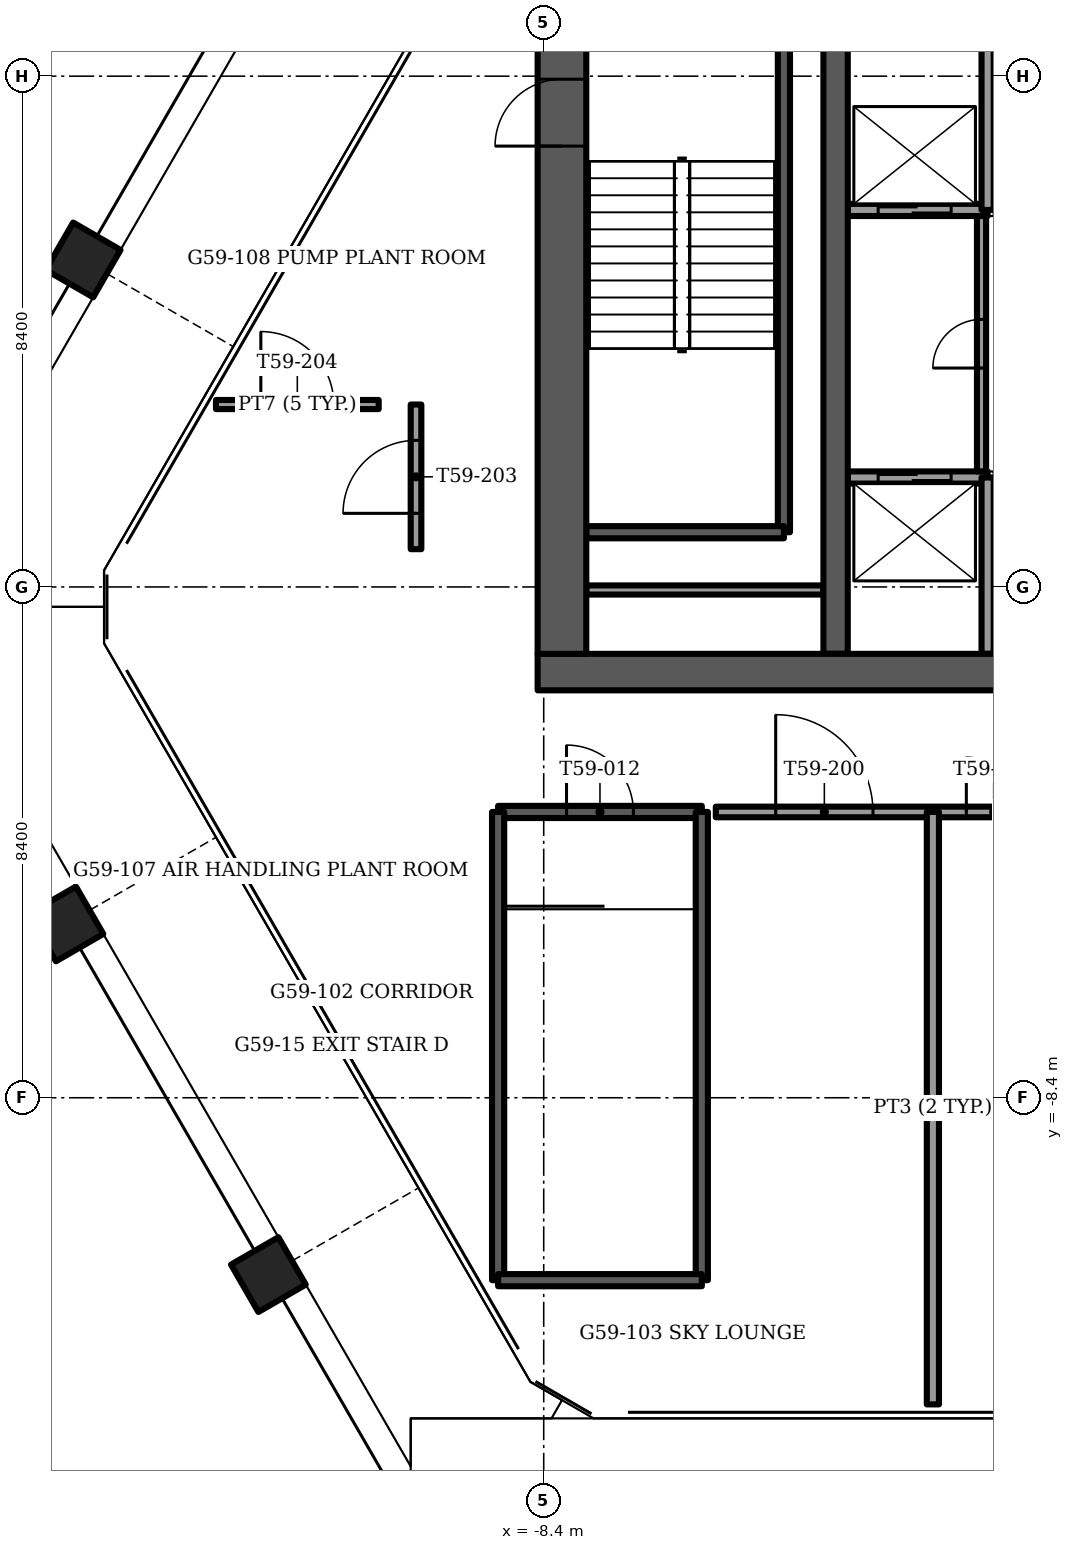
"""IFC4 building model, lengths in metres.
Left out: names, types, materials, properties, quantities, classifications, styles, units other than length and angle.
Written with IfcOpenShell. Run it as: python <this file> out.ifc"""

import sys

from ifc_helpers import new_model, si_unit, direction, frame, frame_2d, origin, origin_2d, place, context, subcontext, project, spatial, rectangle, extrude, element, fill, save


model = new_model("IFC4")
c1 = context("Model", 3, precision=1e-05, world=origin(), true_north=direction((0.0, 1.0)))
c2 = subcontext(c1, "Body", "Model", "MODEL_VIEW")
j1 = project(units=[si_unit("LENGTHUNIT", "METRE"), si_unit("PLANEANGLEUNIT", "RADIAN")], contexts=[c1])
p1 = place(None, origin())
s1 = spatial("IfcSite", under=j1, at=p1, CompositionType="ELEMENT")
p2 = place(p1, origin())
s2 = spatial("IfcBuilding", under=s1, at=p2, CompositionType="ELEMENT")
p3 = place(p2, frame((0.0, 0.0, 237.0)))
s3 = spatial("IfcBuildingStorey", under=s2, at=p3, CompositionType="ELEMENT", Elevation=237.0)
for number, where, z_axis, x_axis in (
    (1, (-15.974, 5.378, -1.2), (0.0, 0.0, 1.0), (0.5, 0.866, 0.0)),
    (2, (-16.257, -5.542, -1.2), (0.0, 0.0, 1.0), (-0.5, 0.866, 0.0)),
    (3, (-12.928, -11.308, -1.2), (0.0, 0.0, 1.0), (-0.5, 0.866, 0.0)),
):
    element("IfcColumn", number, at=place(p3, frame(where, z_axis=z_axis, x_axis=x_axis)), inside=s3, PredefinedType="COLUMN", context=c2, shape_type="SweptSolid", body=[
        extrude(rectangle(XDim=0.9, YDim=0.9, at=origin_2d()), origin(), (0.0, 0.0, 1.0), 8.0),
    ])
p4 = place(p3, frame((-8.5, -1.4, -0.3), z_axis=(0.0, 0.0, 1.0), x_axis=(1.0, 0.0, 0.0)))
e4 = element("IfcWall", 4, at=p4, inside=s3, PredefinedType="SHEAR", context=c2, shape_type="SweptSolid", body=[
    extrude(rectangle(XDim=17.0, YDim=0.6, at=frame_2d((8.5, 0.0))), origin(), (0.0, 0.0, 1.0), 8.0),
])
p5 = place(p4, frame((7.7, 0.0, 0.0)))
e5 = element("IfcOpeningElement", 5, at=p5, cuts=e4, PredefinedType="OPENING", context=c2, shape_type="SweptSolid", body=[
    extrude(rectangle(XDim=1.6, YDim=2.1, at=frame_2d((0.8, 1.05))), frame((0.0, 0.3, 0.0), z_axis=(0.0, -1.0, 0.0), x_axis=(1.0, 0.0, 0.0)), (0.0, 0.0, 1.0), 0.6),
])
p6 = place(p3, frame((-8.1, -1.1, -0.3), z_axis=(0.0, 0.0, 1.0), x_axis=(0.0, 1.0, 0.0)))
e6 = element("IfcWall", 6, at=p6, inside=s3, PredefinedType="SHEAR", context=c2, shape_type="SweptSolid", body=[
    extrude(rectangle(XDim=10.2, YDim=0.8, at=frame_2d((5.1, 0.0))), origin(), (0.0, 0.0, 1.0), 8.0),
])
p7 = place(p6, frame((8.35, 0.0, 0.0)))
e7 = element("IfcOpeningElement", 7, at=p7, cuts=e6, PredefinedType="OPENING", context=c2, shape_type="SweptSolid", body=[
    extrude(rectangle(XDim=1.1, YDim=2.1, at=frame_2d((0.55, 1.05))), frame((0.0, 0.4, 0.0), z_axis=(0.0, -1.0, 0.0), x_axis=(1.0, 0.0, 0.0)), (0.0, 0.0, 1.0), 0.8),
])
p8 = place(p3, frame((-3.6, -1.1, -0.3), z_axis=(0.0, 0.0, 1.0), x_axis=(0.0, 1.0, 0.0)))
e8 = element("IfcWall", 8, at=p8, inside=s3, PredefinedType="SHEAR", context=c2, shape_type="SweptSolid", body=[
    extrude(rectangle(XDim=10.2, YDim=0.4, at=frame_2d((5.1, 0.0))), origin(), (0.0, 0.0, 1.0), 8.0),
])
p9 = place(p3, frame((-3.4, 1.8, 0.0), z_axis=(0.0, 0.0, 1.0), x_axis=(1.0, 0.0, 0.0)))
e9 = element("IfcWall", 9, at=p9, inside=s3, PredefinedType="PARTITIONING", context=c2, shape_type="SweptSolid", body=[
    extrude(rectangle(XDim=2.3, YDim=0.2, at=frame_2d((1.15, 0.0))), origin(), (0.0, 0.0, 1.0), 7.7),
])
p10 = place(p9, frame((0.5, 0.0, 0.0)))
e10 = element("IfcOpeningElement", 10, at=p10, cuts=e9, PredefinedType="OPENING", context=c2, shape_type="SweptSolid", body=[
    extrude(rectangle(XDim=1.2, YDim=2.1, at=frame_2d((0.6, 1.05))), frame((0.0, 0.1, 0.0), z_axis=(0.0, -1.0, 0.0), x_axis=(1.0, 0.0, 0.0)), (0.0, 0.0, 1.0), 0.2),
])
p11 = place(p3, frame((-3.4, 6.2, 0.0), z_axis=(0.0, 0.0, 1.0), x_axis=(1.0, 0.0, 0.0)))
e11 = element("IfcWall", 11, at=p11, inside=s3, PredefinedType="PARTITIONING", context=c2, shape_type="SweptSolid", body=[
    extrude(rectangle(XDim=2.3, YDim=0.2, at=frame_2d((1.15, 0.0))), origin(), (0.0, 0.0, 1.0), 7.7),
])
p12 = place(p11, frame((0.5, 0.0, 0.0)))
e12 = element("IfcOpeningElement", 12, at=p12, cuts=e11, PredefinedType="OPENING", context=c2, shape_type="SweptSolid", body=[
    extrude(rectangle(XDim=1.2, YDim=2.1, at=frame_2d((0.6, 1.05))), frame((0.0, 0.1, 0.0), z_axis=(0.0, -1.0, 0.0), x_axis=(1.0, 0.0, 0.0)), (0.0, 0.0, 1.0), 0.2),
])
for number, where, z_axis, x_axis in (
    (13, (-1.1, -1.1, 0.0), (0.0, 0.0, 1.0), (0.0, 1.0, 0.0)),
    (14, (-1.1, 6.2, 0.0), (0.0, 0.0, 1.0), (0.0, 1.0, 0.0)),
):
    element("IfcWall", number, at=place(p3, frame(where, z_axis=z_axis, x_axis=x_axis)), inside=s3, PredefinedType="PARTITIONING", context=c2, shape_type="SweptSolid", body=[
        extrude(rectangle(XDim=2.9, YDim=0.2, at=frame_2d((1.45, 0.0))), origin(), (0.0, 0.0, 1.0), 7.7),
    ])
p13 = place(p3, frame((-4.45, 0.9, -0.3), z_axis=(0.0, 0.0, 1.0), x_axis=(0.0, 1.0, 0.0)))
e15 = element("IfcWall", 15, at=p13, inside=s3, PredefinedType="SOLIDWALL", context=c2, shape_type="SweptSolid", body=[
    extrude(rectangle(XDim=8.2, YDim=0.2, at=frame_2d((4.1, 0.0))), origin(), (0.0, 0.0, 1.0), 8.0),
])
p14 = place(p3, frame((-7.7, 0.9, -0.3), z_axis=(0.0, 0.0, 1.0), x_axis=(1.0, 0.0, 0.0)))
e16 = element("IfcWall", 16, at=p14, inside=s3, PredefinedType="SOLIDWALL", context=c2, shape_type="SweptSolid", body=[
    extrude(rectangle(XDim=3.25, YDim=0.2, at=frame_2d((1.625, 0.0))), origin(), (0.0, 0.0, 1.0), 8.0),
])
p15 = place(p3, frame((-7.7, -0.05, 0.0), z_axis=(0.0, 0.0, 1.0), x_axis=(1.0, 0.0, 0.0)))
e17 = element("IfcWall", 17, at=p15, inside=s3, PredefinedType="PARTITIONING", context=c2, shape_type="SweptSolid", body=[
    extrude(rectangle(XDim=3.9, YDim=0.15, at=frame_2d((1.95, 0.0))), origin(), (0.0, 0.0, 1.0), 7.7),
])
p16 = place(p3, frame((-9.15, -3.7, -0.3), z_axis=(0.0, 0.0, 1.0), x_axis=(1.0, 0.0, 0.0)))
e18 = element("IfcWall", 18, at=p16, inside=s3, PredefinedType="SOLIDWALL", context=c2, shape_type="SweptSolid", body=[
    extrude(rectangle(XDim=3.35, YDim=0.2, at=frame_2d((1.675, 0.0))), origin(), (0.0, 0.0, 1.0), 8.0),
])
p17 = place(p16, frame((1.125, 0.0, 0.0)))
e19 = element("IfcOpeningElement", 19, at=p17, cuts=e18, PredefinedType="OPENING", context=c2, shape_type="SweptSolid", body=[
    extrude(rectangle(XDim=1.1, YDim=2.1, at=frame_2d((0.55, 1.05))), frame((0.0, 0.1, 0.0), z_axis=(0.0, -1.0, 0.0), x_axis=(1.0, 0.0, 0.0)), (0.0, 0.0, 1.0), 0.2),
])
for number, where, z_axis, x_axis in (
    (20, (-9.15, -3.7, -0.3), (0.0, 0.0, 1.0), (0.0, -1.0, 0.0)),
    (21, (-5.8, -3.7, -0.3), (0.0, 0.0, 1.0), (0.0, -1.0, 0.0)),
):
    element("IfcWall", number, at=place(p3, frame(where, z_axis=z_axis, x_axis=x_axis)), inside=s3, PredefinedType="SOLIDWALL", context=c2, shape_type="SweptSolid", body=[
        extrude(rectangle(XDim=7.7, YDim=0.2, at=frame_2d((3.85, 0.0))), origin(), (0.0, 0.0, 1.0), 8.0),
    ])
p18 = place(p3, frame((-9.15, -11.4, -0.3), z_axis=(0.0, 0.0, 1.0), x_axis=(1.0, 0.0, 0.0)))
e22 = element("IfcWall", 22, at=p18, inside=s3, PredefinedType="SOLIDWALL", context=c2, shape_type="SweptSolid", body=[
    extrude(rectangle(XDim=3.35, YDim=0.2, at=frame_2d((1.675, 0.0))), origin(), (0.0, 0.0, 1.0), 8.0),
])
p19 = place(p3, frame((-1.2, 1.9, 0.0), z_axis=(0.0, 0.0, 1.0), x_axis=(0.0, 1.0, 0.0)))
e23 = element("IfcWall", 23, at=p19, inside=s3, PredefinedType="PARTITIONING", context=c2, shape_type="SweptSolid", body=[
    extrude(rectangle(XDim=4.2, YDim=0.15, at=frame_2d((2.1, 0.0))), origin(), (0.0, 0.0, 1.0), 7.7),
])
p20 = place(p19, frame((1.7, 0.0, 0.0)))
e24 = element("IfcOpeningElement", 24, at=p20, cuts=e23, PredefinedType="OPENING", context=c2, shape_type="SweptSolid", body=[
    extrude(rectangle(XDim=0.8, YDim=2.1, at=frame_2d((0.4, 1.05))), frame((0.0, 0.075, 0.0), z_axis=(0.0, -1.0, 0.0), x_axis=(1.0, 0.0, 0.0)), (0.0, 0.0, 1.0), 0.15),
])
p21 = place(p3, frame((-5.57, -3.7, 0.0), z_axis=(0.0, 0.0, 1.0), x_axis=(1.0, 0.0, 0.0)))
e25 = element("IfcWall", 25, at=p21, inside=s3, PredefinedType="PARTITIONING", context=c2, shape_type="SweptSolid", body=[
    extrude(rectangle(XDim=11.14, YDim=0.175, at=frame_2d((5.57, 0.0))), origin(), (0.0, 0.0, 1.0), 7.7),
])
p22 = place(p21, frame((0.985, 0.0, 0.0)))
e26 = element("IfcOpeningElement", 26, at=p22, cuts=e25, PredefinedType="OPENING", context=c2, shape_type="SweptSolid", body=[
    extrude(rectangle(XDim=1.6, YDim=2.1, at=frame_2d((0.8, 1.05))), frame((0.0, 0.087, 0.0), z_axis=(0.0, -1.0, 0.0), x_axis=(1.0, 0.0, 0.0)), (0.0, 0.0, 1.0), 0.175),
])
p23 = place(p21, frame((4.12, 0.0, 0.0)))
e27 = element("IfcOpeningElement", 27, at=p23, cuts=e25, PredefinedType="OPENING", context=c2, shape_type="SweptSolid", body=[
    extrude(rectangle(XDim=0.9, YDim=2.1, at=frame_2d((0.45, 1.05))), frame((0.0, 0.087, 0.0), z_axis=(0.0, -1.0, 0.0), x_axis=(1.0, 0.0, 0.0)), (0.0, 0.0, 1.0), 0.175),
])
p24 = place(p21, frame((7.555, 0.0, 0.0)))
e28 = element("IfcOpeningElement", 28, at=p24, cuts=e25, PredefinedType="OPENING", context=c2, shape_type="SweptSolid", body=[
    extrude(rectangle(XDim=1.6, YDim=2.1, at=frame_2d((0.8, 1.05))), frame((0.0, 0.087, 0.0), z_axis=(0.0, -1.0, 0.0), x_axis=(1.0, 0.0, 0.0)), (0.0, 0.0, 1.0), 0.175),
])
p25 = place(p3, frame((-10.5, 0.621, 0.0), z_axis=(0.0, 0.0, 1.0), x_axis=(0.0, 1.0, 0.0)))
e29 = element("IfcWall", 29, at=p25, inside=s3, PredefinedType="PARTITIONING", context=c2, shape_type="SweptSolid", body=[
    extrude(rectangle(XDim=2.379, YDim=0.175, at=frame_2d((1.189, 0.0))), origin(), (0.0, 0.0, 1.0), 7.7),
])
p26 = place(p25, frame((0.589, 0.0, 0.0)))
e30 = element("IfcOpeningElement", 30, at=p26, cuts=e29, PredefinedType="OPENING", context=c2, shape_type="SweptSolid", body=[
    extrude(rectangle(XDim=1.2, YDim=2.1, at=frame_2d((0.6, 1.05))), frame((0.0, 0.087, 0.0), z_axis=(0.0, -1.0, 0.0), x_axis=(1.0, 0.0, 0.0)), (0.0, 0.0, 1.0), 0.175),
])
p27 = place(p3, frame((-2.0, -13.443, 0.0), z_axis=(0.0, 0.0, 1.0), x_axis=(0.0, 1.0, 0.0)))
e31 = element("IfcWall", 31, at=p27, inside=s3, PredefinedType="PARTITIONING", context=c2, shape_type="SweptSolid", body=[
    extrude(rectangle(XDim=9.743, YDim=0.2, at=frame_2d((4.871, 0.0))), origin(), (0.0, 0.0, 1.0), 7.7),
])
p28 = place(p3, frame((-13.79, 3.0, 0.0), z_axis=(0.0, 0.0, 1.0), x_axis=(1.0, 0.0, 0.0)))
e32 = element("IfcWall", 32, at=p28, inside=s3, PredefinedType="PARTITIONING", context=c2, shape_type="SweptSolid", body=[
    extrude(rectangle(XDim=2.676, YDim=0.15, at=frame_2d((1.338, 0.0))), origin(), (0.0, 0.0, 1.0), 7.7),
])
p29 = place(p28, frame((0.738, 0.0, 0.0)))
e33 = element("IfcOpeningElement", 33, at=p29, cuts=e32, PredefinedType="OPENING", context=c2, shape_type="SweptSolid", body=[
    extrude(rectangle(XDim=1.2, YDim=2.1, at=frame_2d((0.6, 1.05))), frame((0.0, 0.075, 0.0), z_axis=(0.0, -1.0, 0.0), x_axis=(1.0, 0.0, 0.0)), (0.0, 0.0, 1.0), 0.15),
])
p30 = place(p10, origin())
e34 = element("IfcDoor", 34, at=p30, inside=s3, OperationType="SLIDING_TO_LEFT", PredefinedType="DOOR", context=c2, shape_type="SweptSolid", body=[
    extrude(rectangle(XDim=1.2, YDim=2.1, at=frame_2d((0.6, 1.05))), frame((0.0, 0.025, 0.0), z_axis=(0.0, -1.0, 0.0), x_axis=(1.0, 0.0, 0.0)), (0.0, 0.0, 1.0), 0.05),
])
fill(e10, e34)
p31 = place(p12, origin())
e35 = element("IfcDoor", 35, at=p31, inside=s3, OperationType="SLIDING_TO_LEFT", PredefinedType="DOOR", context=c2, shape_type="SweptSolid", body=[
    extrude(rectangle(XDim=1.2, YDim=2.1, at=frame_2d((0.6, 1.05))), frame((0.0, 0.025, 0.0), z_axis=(0.0, -1.0, 0.0), x_axis=(1.0, 0.0, 0.0)), (0.0, 0.0, 1.0), 0.05),
])
fill(e12, e35)
p32 = place(p7, origin())
e36 = element("IfcDoor", 36, at=p32, inside=s3, OperationType="SINGLE_SWING_RIGHT", PredefinedType="DOOR", context=c2, shape_type="SweptSolid", body=[
    extrude(rectangle(XDim=1.1, YDim=2.1, at=frame_2d((0.55, 1.05))), frame((0.0, 0.025, 0.0), z_axis=(0.0, -1.0, 0.0), x_axis=(1.0, 0.0, 0.0)), (0.0, 0.0, 1.0), 0.05),
])
fill(e7, e36)
p33 = place(p17, origin())
e37 = element("IfcDoor", 37, at=p33, inside=s3, OperationType="SINGLE_SWING_LEFT", PredefinedType="DOOR", context=c2, shape_type="SweptSolid", body=[
    extrude(rectangle(XDim=1.1, YDim=2.1, at=frame_2d((0.55, 1.05))), frame((0.0, 0.025, 0.0), z_axis=(0.0, -1.0, 0.0), x_axis=(1.0, 0.0, 0.0)), (0.0, 0.0, 1.0), 0.05),
])
fill(e19, e37)
p34 = place(p20, origin())
e38 = element("IfcDoor", 38, at=p34, inside=s3, OperationType="SINGLE_SWING_LEFT", PredefinedType="DOOR", context=c2, shape_type="SweptSolid", body=[
    extrude(rectangle(XDim=0.8, YDim=2.1, at=frame_2d((0.4, 1.05))), frame((0.0, 0.025, 0.0), z_axis=(0.0, -1.0, 0.0), x_axis=(1.0, 0.0, 0.0)), (0.0, 0.0, 1.0), 0.05),
])
fill(e24, e38)
p35 = place(p22, origin())
e39 = element("IfcDoor", 39, at=p35, inside=s3, OperationType="DOUBLE_DOOR_SINGLE_SWING", PredefinedType="DOOR", context=c2, shape_type="SweptSolid", body=[
    extrude(rectangle(XDim=1.6, YDim=2.1, at=frame_2d((0.8, 1.05))), frame((0.0, 0.025, 0.0), z_axis=(0.0, -1.0, 0.0), x_axis=(1.0, 0.0, 0.0)), (0.0, 0.0, 1.0), 0.05),
])
fill(e26, e39)
p36 = place(p23, origin())
e40 = element("IfcDoor", 40, at=p36, inside=s3, OperationType="SINGLE_SWING_LEFT", PredefinedType="DOOR", context=c2, shape_type="SweptSolid", body=[
    extrude(rectangle(XDim=0.9, YDim=2.1, at=frame_2d((0.45, 1.05))), frame((0.0, 0.025, 0.0), z_axis=(0.0, -1.0, 0.0), x_axis=(1.0, 0.0, 0.0)), (0.0, 0.0, 1.0), 0.05),
])
fill(e27, e40)
p37 = place(p26, origin())
e41 = element("IfcDoor", 41, at=p37, inside=s3, OperationType="SINGLE_SWING_LEFT", PredefinedType="DOOR", context=c2, shape_type="SweptSolid", body=[
    extrude(rectangle(XDim=1.2, YDim=2.1, at=frame_2d((0.6, 1.05))), frame((0.0, 0.025, 0.0), z_axis=(0.0, -1.0, 0.0), x_axis=(1.0, 0.0, 0.0)), (0.0, 0.0, 1.0), 0.05),
])
fill(e30, e41)
p38 = place(p29, origin())
e42 = element("IfcDoor", 42, at=p38, inside=s3, OperationType="SINGLE_SWING_RIGHT", PredefinedType="DOOR", context=c2, shape_type="SweptSolid", body=[
    extrude(rectangle(XDim=1.2, YDim=2.1, at=frame_2d((0.6, 1.05))), frame((0.0, 0.025, 0.0), z_axis=(0.0, -1.0, 0.0), x_axis=(1.0, 0.0, 0.0)), (0.0, 0.0, 1.0), 0.05),
])
fill(e33, e42)
save(model, sys.argv[1])
